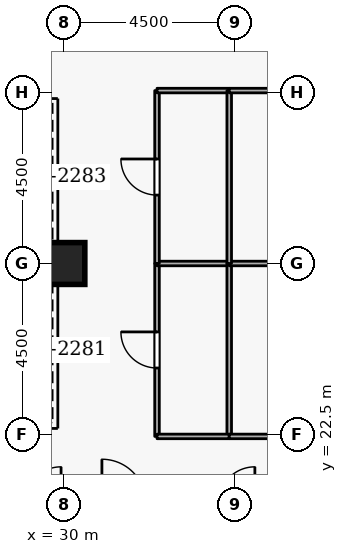
"""IFC4 building model, lengths in metres.
Left out: names, types, materials, properties, quantities, classifications, styles, units other than length and angle.
Written with IfcOpenShell. Run it as: python <this file> out.ifc"""

import sys

from ifc_helpers import new_model, si_unit, direction, frame, frame_2d, origin, origin_2d, place, context, subcontext, project, spatial, rectangle, extrude, element, fill, save


model = new_model("IFC4")
c1 = context("Model", 3, precision=1e-05, world=origin(), true_north=direction((0.0, 1.0)))
c2 = subcontext(c1, "Body", "Model", "MODEL_VIEW")
j1 = project(units=[si_unit("LENGTHUNIT", "METRE"), si_unit("PLANEANGLEUNIT", "RADIAN")], contexts=[c1])
p1 = place(None, origin())
s1 = spatial("IfcSite", under=j1, at=p1, CompositionType="ELEMENT")
p2 = place(p1, origin())
s2 = spatial("IfcBuilding", under=s1, at=p2, CompositionType="ELEMENT")
p3 = place(p2, frame((0.0, 0.0, 192.9)))
s3 = spatial("IfcBuildingStorey", under=s2, at=p3, CompositionType="ELEMENT", Elevation=192.9)
p4 = place(p3, frame((30.0, 27.0, 0.0), z_axis=(0.0, 0.0, 1.0), x_axis=(1.0, 0.0, 0.0)))
e1 = element("IfcColumn", 1, at=p4, inside=s3, PredefinedType="COLUMN", context=c2, shape_type="SweptSolid", body=[
    extrude(rectangle(XDim=1.1, YDim=1.1, at=origin_2d()), origin(), (0.0, 0.0, 1.0), 3.6),
])
p5 = place(p3, frame((32.45, 22.45, 0.0), z_axis=(0.0, 0.0, 1.0), x_axis=(0.0, 1.0, 0.0)))
e2 = element("IfcWall", 2, at=p5, inside=s3, PredefinedType="PARTITIONING", context=c2, shape_type="SweptSolid", body=[
    extrude(rectangle(XDim=4.55, YDim=0.12, at=frame_2d((2.275, 0.0))), origin(), (0.0, 0.0, 1.0), 3.34),
])
p6 = place(p5, frame((1.8, 0.0, 0.0)))
e3 = element("IfcOpeningElement", 3, at=p6, cuts=e2, PredefinedType="OPENING", context=c2, shape_type="SweptSolid", body=[
    extrude(rectangle(XDim=0.95, YDim=2.1, at=frame_2d((0.475, 1.05))), frame((0.0, 0.07, 0.0), z_axis=(0.0, -1.0, 0.0), x_axis=(1.0, 0.0, 0.0)), (0.0, 0.0, 1.0), 0.14),
])
p7 = place(p3, frame((32.45, 27.0, 0.0), z_axis=(0.0, 0.0, 1.0), x_axis=(1.0, 0.0, 0.0)))
e4 = element("IfcWall", 4, at=p7, inside=s3, PredefinedType="PARTITIONING", context=c2, shape_type="SweptSolid", body=[
    extrude(rectangle(XDim=1.9, YDim=0.12, at=frame_2d((0.95, 0.0))), origin(), (0.0, 0.0, 1.0), 3.34),
])
p8 = place(p3, frame((34.35, 27.0, 0.0), z_axis=(0.0, 0.0, 1.0), x_axis=(0.0, -1.0, 0.0)))
e5 = element("IfcWall", 5, at=p8, inside=s3, PredefinedType="PARTITIONING", context=c2, shape_type="SweptSolid", body=[
    extrude(rectangle(XDim=4.55, YDim=0.12, at=frame_2d((2.275, 0.0))), origin(), (0.0, 0.0, 1.0), 3.34),
])
p9 = place(p3, frame((34.35, 22.45, 0.0), z_axis=(0.0, 0.0, 1.0), x_axis=(-1.0, 0.0, 0.0)))
e6 = element("IfcWall", 6, at=p9, inside=s3, PredefinedType="PARTITIONING", context=c2, shape_type="SweptSolid", body=[
    extrude(rectangle(XDim=1.9, YDim=0.12, at=frame_2d((0.95, 0.0))), origin(), (0.0, 0.0, 1.0), 3.34),
])
p10 = place(p3, frame((37.75, 22.45, 0.0), z_axis=(0.0, 0.0, 1.0), x_axis=(-1.0, 0.0, 0.0)))
e7 = element("IfcWall", 7, at=p10, inside=s3, PredefinedType="PARTITIONING", context=c2, shape_type="SweptSolid", body=[
    extrude(rectangle(XDim=3.4, YDim=0.12, at=frame_2d((1.7, 0.0))), origin(), (0.0, 0.0, 1.0), 3.34),
])
p11 = place(p10, frame((1.175, 0.0, 0.0)))
e8 = element("IfcOpeningElement", 8, at=p11, cuts=e7, PredefinedType="OPENING", context=c2, shape_type="SweptSolid", body=[
    extrude(rectangle(XDim=1.05, YDim=2.1, at=frame_2d((0.525, 1.05))), frame((0.0, 0.07, 0.0), z_axis=(0.0, -1.0, 0.0), x_axis=(1.0, 0.0, 0.0)), (0.0, 0.0, 1.0), 0.14),
])
p12 = place(p3, frame((34.35, 27.0, 0.0), z_axis=(0.0, 0.0, 1.0), x_axis=(1.0, 0.0, 0.0)))
e9 = element("IfcWall", 9, at=p12, inside=s3, PredefinedType="PARTITIONING", context=c2, shape_type="SweptSolid", body=[
    extrude(rectangle(XDim=14.87, YDim=0.12, at=frame_2d((7.435, 0.0))), origin(), (0.0, 0.0, 1.0), 2.882),
])
p13 = place(p3, frame((32.45, 27.0, 0.0), z_axis=(0.0, 0.0, 1.0), x_axis=(0.0, 1.0, 0.0)))
e10 = element("IfcWall", 10, at=p13, inside=s3, PredefinedType="PARTITIONING", context=c2, shape_type="SweptSolid", body=[
    extrude(rectangle(XDim=4.55, YDim=0.12, at=frame_2d((2.275, 0.0))), origin(), (0.0, 0.0, 1.0), 3.34),
])
p14 = place(p13, frame((1.8, 0.0, 0.0)))
e11 = element("IfcOpeningElement", 11, at=p14, cuts=e10, PredefinedType="OPENING", context=c2, shape_type="SweptSolid", body=[
    extrude(rectangle(XDim=0.95, YDim=2.1, at=frame_2d((0.475, 1.05))), frame((0.0, 0.07, 0.0), z_axis=(0.0, -1.0, 0.0), x_axis=(1.0, 0.0, 0.0)), (0.0, 0.0, 1.0), 0.14),
])
p15 = place(p3, frame((32.45, 31.55, 0.0), z_axis=(0.0, 0.0, 1.0), x_axis=(1.0, 0.0, 0.0)))
e12 = element("IfcWall", 12, at=p15, inside=s3, PredefinedType="PARTITIONING", context=c2, shape_type="SweptSolid", body=[
    extrude(rectangle(XDim=1.9, YDim=0.12, at=frame_2d((0.95, 0.0))), origin(), (0.0, 0.0, 1.0), 3.34),
])
p16 = place(p3, frame((34.35, 31.55, 0.0), z_axis=(0.0, 0.0, 1.0), x_axis=(0.0, -1.0, 0.0)))
e13 = element("IfcWall", 13, at=p16, inside=s3, PredefinedType="PARTITIONING", context=c2, shape_type="SweptSolid", body=[
    extrude(rectangle(XDim=4.55, YDim=0.12, at=frame_2d((2.275, 0.0))), origin(), (0.0, 0.0, 1.0), 3.34),
])
p17 = place(p3, frame((34.35, 31.55, 0.0), z_axis=(0.0, 0.0, 1.0), x_axis=(1.0, 0.0, 0.0)))
e14 = element("IfcWall", 14, at=p17, inside=s3, PredefinedType="PARTITIONING", context=c2, shape_type="SweptSolid", body=[
    extrude(rectangle(XDim=1.45, YDim=0.12, at=frame_2d((0.725, 0.0))), origin(), (0.0, 0.0, 1.0), 3.34),
])
p18 = place(p6, origin())
e15 = element("IfcDoor", 15, at=p18, inside=s3, OperationType="SINGLE_SWING_RIGHT", PredefinedType="DOOR", context=c2, shape_type="SweptSolid", body=[
    extrude(rectangle(XDim=0.95, YDim=2.1, at=frame_2d((0.475, 1.05))), frame((0.0, 0.025, 0.0), z_axis=(0.0, -1.0, 0.0), x_axis=(1.0, 0.0, 0.0)), (0.0, 0.0, 1.0), 0.05),
])
fill(e3, e15)
p19 = place(p14, origin())
e16 = element("IfcDoor", 16, at=p19, inside=s3, OperationType="SINGLE_SWING_RIGHT", PredefinedType="DOOR", context=c2, shape_type="SweptSolid", body=[
    extrude(rectangle(XDim=0.95, YDim=2.1, at=frame_2d((0.475, 1.05))), frame((0.0, 0.025, 0.0), z_axis=(0.0, -1.0, 0.0), x_axis=(1.0, 0.0, 0.0)), (0.0, 0.0, 1.0), 0.05),
])
fill(e11, e16)
save(model, sys.argv[1])
